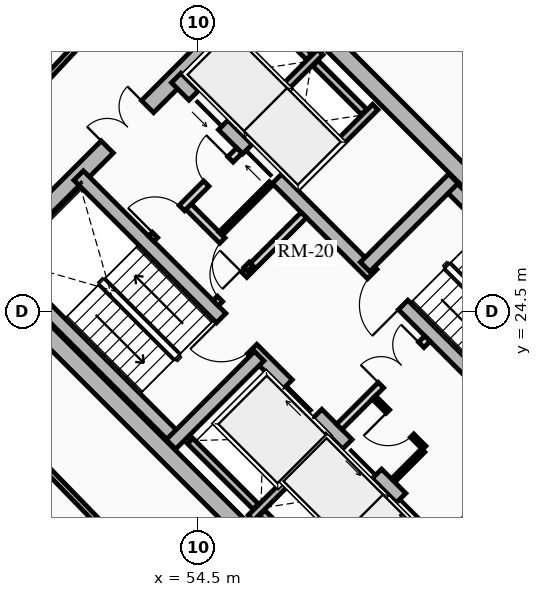
"""IFC4 building model, lengths in metres.
Left out: names, types, materials, properties, quantities, classifications, styles, units other than length and angle.
Written with IfcOpenShell. Run it as: python <this file> out.ifc"""

import sys

from ifc_helpers import new_model, si_unit, direction, frame, frame_2d, origin, place, context, subcontext, project, spatial, rectangle, extrude, source, transform, mapped, element, fill, save


model = new_model("IFC4")
c1 = context("Model", 3, precision=1e-05, world=origin(), true_north=direction((0.0, 1.0)))
c2 = subcontext(c1, "Body", "Model", "MODEL_VIEW")
j1 = project(units=[si_unit("LENGTHUNIT", "METRE"), si_unit("PLANEANGLEUNIT", "RADIAN")], contexts=[c1])
p1 = place(None, origin())
s1 = spatial("IfcSite", under=j1, at=p1, CompositionType="ELEMENT")
p2 = place(p1, origin())
s2 = spatial("IfcBuilding", under=s1, at=p2, CompositionType="ELEMENT")
p3 = place(p2, frame((0.0, 0.0, 125.44)))
s3 = spatial("IfcBuildingStorey", under=s2, at=p3, CompositionType="ELEMENT", Elevation=125.44)
for number, where, z_axis, x_axis in (
    (1, (58.737, 15.697, 0.0), (0.0, 0.0, 1.0), (-0.707, 0.707, 0.0)),
    (2, (66.303, 23.263, 0.0), (0.0, 0.0, 1.0), (-0.707, 0.707, 0.0)),
):
    element("IfcWall", number, at=place(p3, frame(where, z_axis=z_axis, x_axis=x_axis)), inside=s3, PredefinedType="SHEAR", context=c2, shape_type="SweptSolid", body=[
        extrude(rectangle(XDim=14.2, YDim=0.45, at=frame_2d((7.1, 0.0))), origin(), (0.0, 0.0, 1.0), 3.72),
    ])
p4 = place(p3, frame((58.578, 15.856, 0.0), z_axis=(0.0, 0.0, 1.0), x_axis=(0.707106781187, 0.707106781187, 0.0)))
e3 = element("IfcWall", 3, at=p4, inside=s3, PredefinedType="SHEAR", context=c2, shape_type="SweptSolid", body=[
    extrude(rectangle(XDim=10.7, YDim=0.45, at=frame_2d((5.35, 0.0))), origin(), (0.0, 0.0, 1.0), 3.72),
])
m1 = source(origin(), c2, "Body", "SweptSolid", [
    extrude(rectangle(XDim=1.5, YDim=2.02, at=frame_2d((0.75, 1.01))), frame((0.0, 0.235, 0.0), z_axis=(0.0, -1.0, 0.0), x_axis=(1.0, 0.0, 0.0)), (0.0, 0.0, 1.0), 0.47),
])
p5 = place(p4, frame((5.45, 0.0, 0.0)))
e4 = element("IfcOpeningElement", 4, at=p5, cuts=e3, PredefinedType="OPENING", context=c2, shape_type="MappedRepresentation", body=[
    mapped(m1, transform((0.0, 0.0, 0.0), x_axis=(1.0, 0.0, 0.0), y_axis=(0.0, 1.0, 0.0), z_axis=(0.0, 0.0, 1.0), scale=1.0)),
])
p6 = place(p3, frame((48.856, 25.578, 0.0), z_axis=(0.0, 0.0, 1.0), x_axis=(0.707106781187, 0.707106781187, 0.0)))
e5 = element("IfcWall", 5, at=p6, inside=s3, PredefinedType="SHEAR", context=c2, shape_type="SweptSolid", body=[
    extrude(rectangle(XDim=10.7, YDim=0.45, at=frame_2d((5.35, 0.0))), origin(), (0.0, 0.0, 1.0), 3.72),
])
p7 = place(p6, frame((4.6, 0.0, 0.0)))
e6 = element("IfcOpeningElement", 6, at=p7, cuts=e5, PredefinedType="OPENING", context=c2, shape_type="MappedRepresentation", body=[
    mapped(m1, transform((0.0, 0.0, 0.0), x_axis=(1.0, 0.0, 0.0), y_axis=(0.0, 1.0, 0.0), z_axis=(0.0, 0.0, 1.0), scale=1.0)),
])
p8 = place(p3, frame((61.078, 18.355, 0.0), z_axis=(0.0, 0.0, 1.0), x_axis=(-0.707106781187, 0.707106781187, 0.0)))
e7 = element("IfcWall", 7, at=p8, inside=s3, PredefinedType="SHEAR", context=c2, shape_type="SweptSolid", body=[
    extrude(rectangle(XDim=13.75, YDim=0.35, at=frame_2d((6.875, 0.0))), origin(), (0.0, 0.0, 1.0), 3.72),
])
m2 = source(origin(), c2, "Body", "SweptSolid", [
    extrude(rectangle(XDim=1.1, YDim=2.015, at=frame_2d((0.55, 1.007))), frame((0.0, 0.185, 0.0), z_axis=(0.0, -1.0, 0.0), x_axis=(1.0, 0.0, 0.0)), (0.0, 0.0, 1.0), 0.37),
])
p9 = place(p8, frame((4.875, 0.0, 0.0)))
e8 = element("IfcOpeningElement", 8, at=p9, cuts=e7, PredefinedType="OPENING", context=c2, shape_type="MappedRepresentation", body=[
    mapped(m2, transform((0.0, 0.0, 0.0), x_axis=(1.0, 0.0, 0.0), y_axis=(0.0, 1.0, 0.0), z_axis=(0.0, 0.0, 1.0), scale=1.0)),
])
p10 = place(p8, frame((0.65, 0.0, 0.0)))
e9 = element("IfcOpeningElement", 9, at=p10, cuts=e7, PredefinedType="OPENING", context=c2, shape_type="MappedRepresentation", body=[
    mapped(m2, transform((0.0, 0.0, 0.0), x_axis=(1.0, 0.0, 0.0), y_axis=(0.0, 1.0, 0.0), z_axis=(0.0, 0.0, 1.0), scale=1.0)),
])
p11 = place(p8, frame((2.65, 0.0, 0.0)))
e10 = element("IfcOpeningElement", 10, at=p11, cuts=e7, PredefinedType="OPENING", context=c2, shape_type="MappedRepresentation", body=[
    mapped(m2, transform((0.0, 0.0, 0.0), x_axis=(1.0, 0.0, 0.0), y_axis=(0.0, 1.0, 0.0), z_axis=(0.0, 0.0, 1.0), scale=1.0)),
])
m3 = source(origin(), c2, "Body", "SweptSolid", [
    extrude(rectangle(XDim=1.15, YDim=2.02, at=frame_2d((0.575, 1.01))), frame((0.0, 0.185, 0.0), z_axis=(0.0, -1.0, 0.0), x_axis=(1.0, 0.0, 0.0)), (0.0, 0.0, 1.0), 0.37),
])
p12 = place(p8, frame((7.295, 0.0, 0.0)))
e11 = element("IfcOpeningElement", 11, at=p12, cuts=e7, PredefinedType="OPENING", context=c2, shape_type="MappedRepresentation", body=[
    mapped(m3, transform((0.0, 0.0, 0.0), x_axis=(1.0, 0.0, 0.0), y_axis=(0.0, 1.0, 0.0), z_axis=(0.0, 0.0, 1.0), scale=1.0)),
])
p13 = place(p3, frame((63.645, 20.922, 0.0), z_axis=(0.0, 0.0, 1.0), x_axis=(-0.707106781187, 0.707106781187, 0.0)))
e12 = element("IfcWall", 12, at=p13, inside=s3, PredefinedType="SHEAR", context=c2, shape_type="SweptSolid", body=[
    extrude(rectangle(XDim=13.75, YDim=0.35, at=frame_2d((6.875, 0.0))), origin(), (0.0, 0.0, 1.0), 3.72),
])
p14 = place(p13, frame((10.0, 0.0, 0.0)))
e13 = element("IfcOpeningElement", 13, at=p14, cuts=e12, PredefinedType="OPENING", context=c2, shape_type="MappedRepresentation", body=[
    mapped(m2, transform((0.0, 0.0, 0.0), x_axis=(1.0, 0.0, 0.0), y_axis=(0.0, 1.0, 0.0), z_axis=(0.0, 0.0, 1.0), scale=1.0)),
])
p15 = place(p13, frame((12.0, 0.0, 0.0)))
e14 = element("IfcOpeningElement", 14, at=p15, cuts=e12, PredefinedType="OPENING", context=c2, shape_type="MappedRepresentation", body=[
    mapped(m2, transform((0.0, 0.0, 0.0), x_axis=(1.0, 0.0, 0.0), y_axis=(0.0, 1.0, 0.0), z_axis=(0.0, 0.0, 1.0), scale=1.0)),
])
p16 = place(p13, frame((5.305, 0.0, 0.0)))
e15 = element("IfcOpeningElement", 15, at=p16, cuts=e12, PredefinedType="OPENING", context=c2, shape_type="MappedRepresentation", body=[
    mapped(m3, transform((0.0, 0.0, 0.0), x_axis=(1.0, 0.0, 0.0), y_axis=(0.0, 1.0, 0.0), z_axis=(0.0, 0.0, 1.0), scale=1.0)),
])
p17 = place(p3, frame((53.922, 21.141, 0.0), z_axis=(0.0, 0.0, 1.0), x_axis=(-0.707088616009, 0.707124945897, 0.0)))
e16 = element("IfcWall", 16, at=p17, inside=s3, PredefinedType="SHEAR", context=c2, shape_type="SweptSolid", body=[
    extrude(rectangle(XDim=6.72, YDim=0.35, at=frame_2d((3.36, 0.0))), origin(), (0.0, 0.0, 1.0), 3.72),
])
p18 = place(p3, frame((53.784, 21.003, 0.0), z_axis=(0.0, 0.0, 1.0), x_axis=(0.707106781187, 0.707106781187, 0.0)))
e17 = element("IfcWall", 17, at=p18, inside=s3, PredefinedType="SHEAR", context=c2, shape_type="SweptSolid", body=[
    extrude(rectangle(XDim=3.285, YDim=0.35, at=frame_2d((1.643, 0.0))), origin(), (0.0, 0.0, 1.0), 3.72),
])
p19 = place(p3, frame((65.83, 23.107, 0.0), z_axis=(0.0, 0.0, 1.0), x_axis=(-0.707088616009, 0.707124945897, 0.0)))
e18 = element("IfcWall", 18, at=p19, inside=s3, PredefinedType="SHEAR", context=c2, shape_type="SweptSolid", body=[
    extrude(rectangle(XDim=6.72, YDim=0.35, at=frame_2d((3.36, 0.0))), origin(), (0.0, 0.0, 1.0), 3.72),
])
p20 = place(p3, frame((58.893, 25.674, 0.0), z_axis=(0.0, 0.0, 1.0), x_axis=(0.707106781187, 0.707106781187, 0.0)))
e19 = element("IfcWall", 19, at=p20, inside=s3, PredefinedType="SHEAR", context=c2, shape_type="SweptSolid", body=[
    extrude(rectangle(XDim=3.285, YDim=0.35, at=frame_2d((1.643, 0.0))), origin(), (0.0, 0.0, 1.0), 3.72),
])
p21 = place(p3, frame((55.888, 19.069, 0.0), z_axis=(0.0, 0.0, 1.0), x_axis=(0.707106781187, 0.707106781187, 0.0)))
e20 = element("IfcWall", 20, at=p21, inside=s3, PredefinedType="SHEAR", context=c2, shape_type="SweptSolid", body=[
    extrude(rectangle(XDim=2.97, YDim=0.2, at=frame_2d((1.485, 0.0))), origin(), (0.0, 0.0, 1.0), 3.72),
])
p22 = place(p3, frame((56.015, 19.366, 0.0), z_axis=(0.0, 0.0, 1.0), x_axis=(-0.707106781187, 0.707106781187, 0.0)))
e21 = element("IfcWall", 21, at=p22, inside=s3, PredefinedType="SHEAR", context=c2, shape_type="SweptSolid", body=[
    extrude(rectangle(XDim=2.44, YDim=0.2, at=frame_2d((1.22, 0.0))), origin(), (0.0, 0.0, 1.0), 3.72),
])
p23 = place(p3, frame((57.284, 17.673, 0.0), z_axis=(0.0, 0.0, 1.0), x_axis=(0.707147878904, 0.70706568108, 0.0)))
e22 = element("IfcWall", 22, at=p23, inside=s3, PredefinedType="SHEAR", context=c2, shape_type="SweptSolid", body=[
    extrude(rectangle(XDim=2.97, YDim=0.2, at=frame_2d((1.485, 0.0))), origin(), (0.0, 0.0, 1.0), 3.72),
])
p24 = place(p3, frame((57.412, 17.97, 0.0), z_axis=(0.0, 0.0, 1.0), x_axis=(-0.707106781187, 0.707106781187, 0.0)))
e23 = element("IfcWall", 23, at=p24, inside=s3, PredefinedType="SHEAR", context=c2, shape_type="SweptSolid", body=[
    extrude(rectangle(XDim=1.735, YDim=0.2, at=frame_2d((0.867, 0.0))), origin(), (0.0, 0.0, 1.0), 3.72),
])
p25 = place(p3, frame((57.062, 27.781, 0.0), z_axis=(0.0, 0.0, 1.0), x_axis=(0.707106781187, 0.707106781187, 0.0)))
e24 = element("IfcWall", 24, at=p25, inside=s3, PredefinedType="SHEAR", context=c2, shape_type="SweptSolid", body=[
    extrude(rectangle(XDim=2.97, YDim=0.2, at=frame_2d((1.485, 0.0))), origin(), (0.0, 0.0, 1.0), 3.72),
])
p26 = place(p3, frame((55.615, 29.227, 0.0), z_axis=(0.0, 0.0, 1.0), x_axis=(0.707147878904, 0.70706568108, 0.0)))
e25 = element("IfcWall", 25, at=p26, inside=s3, PredefinedType="SHEAR", context=c2, shape_type="SweptSolid", body=[
    extrude(rectangle(XDim=2.97, YDim=0.2, at=frame_2d((1.485, 0.0))), origin(), (0.0, 0.0, 1.0), 3.72),
])
p27 = place(p3, frame((58.865, 29.754, 0.0), z_axis=(0.0, 0.0, 1.0), x_axis=(-0.707174411312, 0.707039144592, 0.0)))
e26 = element("IfcWall", 26, at=p27, inside=s3, PredefinedType="SHEAR", context=c2, shape_type="SweptSolid", body=[
    extrude(rectangle(XDim=1.805, YDim=0.2, at=frame_2d((0.902, 0.0))), origin(), (0.0, 0.0, 1.0), 3.72),
])
p28 = place(p3, frame((57.419, 31.2, 0.0), z_axis=(0.0, 0.0, 1.0), x_axis=(-0.707032117043, 0.707181437447, 0.0)))
e27 = element("IfcWall", 27, at=p28, inside=s3, PredefinedType="SHEAR", context=c2, shape_type="SweptSolid", body=[
    extrude(rectangle(XDim=1.635, YDim=0.2, at=frame_2d((0.817, 0.0))), origin(), (0.0, 0.0, 1.0), 3.72),
])
p29 = place(p3, frame((58.214, 21.467, 0.0), z_axis=(0.0, 0.0, 1.0), x_axis=(0.707106781187, 0.707106781187, 0.0)))
e28 = element("IfcWall", 28, at=p29, inside=s3, PredefinedType="PARTITIONING", context=c2, shape_type="SweptSolid", body=[
    extrude(rectangle(XDim=3.28, YDim=0.2, at=frame_2d((1.64, 0.0))), origin(), (0.0, 0.0, 1.0), 3.425),
])
m4 = source(origin(), c2, "Body", "SweptSolid", [
    extrude(rectangle(XDim=1.5, YDim=2.02, at=frame_2d((0.75, 1.01))), frame((0.0, 0.11, 0.0), z_axis=(0.0, -1.0, 0.0), x_axis=(1.0, 0.0, 0.0)), (0.0, 0.0, 1.0), 0.22),
])
p30 = place(p29, frame((1.55, 0.0, 0.0)))
e29 = element("IfcOpeningElement", 29, at=p30, cuts=e28, PredefinedType="OPENING", context=c2, shape_type="MappedRepresentation", body=[
    mapped(m4, transform((0.0, 0.0, 0.0), x_axis=(1.0, 0.0, 0.0), y_axis=(0.0, 1.0, 0.0), z_axis=(0.0, 0.0, 1.0), scale=1.0)),
])
p31 = place(p3, frame((54.961, 24.719, 0.0), z_axis=(0.0, 0.0, 1.0), x_axis=(0.707106781187, 0.707106781187, 0.0)))
e30 = element("IfcWall", 30, at=p31, inside=s3, PredefinedType="PARTITIONING", context=c2, shape_type="SweptSolid", body=[
    extrude(rectangle(XDim=3.28, YDim=0.2, at=frame_2d((1.64, 0.0))), origin(), (0.0, 0.0, 1.0), 3.425),
])
m5 = source(origin(), c2, "Body", "SweptSolid", [
    extrude(rectangle(XDim=0.9, YDim=2.005, at=frame_2d((0.45, 1.002))), frame((0.0, 0.11, 0.0), z_axis=(0.0, -1.0, 0.0), x_axis=(1.0, 0.0, 0.0)), (0.0, 0.0, 1.0), 0.22),
])
p32 = place(p31, frame((0.16, 0.0, 0.0)))
e31 = element("IfcOpeningElement", 31, at=p32, cuts=e30, PredefinedType="OPENING", context=c2, shape_type="MappedRepresentation", body=[
    mapped(m5, transform((0.0, 0.0, 0.0), x_axis=(1.0, 0.0, 0.0), y_axis=(0.0, 1.0, 0.0), z_axis=(0.0, 0.0, 1.0), scale=1.0)),
])
p33 = place(p3, frame((55.874, 25.631, 0.0), z_axis=(0.0, 0.0, 1.0), x_axis=(-0.707157639372, 0.707055919343, 0.0)))
e32 = element("IfcWall", 32, at=p33, inside=s3, PredefinedType="PARTITIONING", context=c2, shape_type="SweptSolid", body=[
    extrude(rectangle(XDim=2.4, YDim=0.2, at=frame_2d((1.2, 0.0))), origin(), (0.0, 0.0, 1.0), 3.425),
])
p34 = place(p33, frame((0.14, 0.0, 0.0)))
e33 = element("IfcOpeningElement", 33, at=p34, cuts=e32, PredefinedType="OPENING", context=c2, shape_type="MappedRepresentation", body=[
    mapped(m5, transform((0.0, 0.0, 0.0), x_axis=(1.0, 0.0, 0.0), y_axis=(0.0, 1.0, 0.0), z_axis=(0.0, 0.0, 1.0), scale=1.0)),
])
p35 = place(p3, frame((53.264, 26.416, 0.0), z_axis=(0.0, 0.0, 1.0), x_axis=(0.707106781187, 0.707106781187, 0.0)))
e34 = element("IfcWall", 34, at=p35, inside=s3, PredefinedType="PARTITIONING", context=c2, shape_type="SweptSolid", body=[
    extrude(rectangle(XDim=3.28, YDim=0.2, at=frame_2d((1.64, 0.0))), origin(), (0.0, 0.0, 1.0), 3.425),
])
m6 = source(origin(), c2, "Body", "SweptSolid", [
    extrude(rectangle(XDim=1.0, YDim=2.015, at=frame_2d((0.5, 1.007))), frame((0.0, 0.11, 0.0), z_axis=(0.0, -1.0, 0.0), x_axis=(1.0, 0.0, 0.0)), (0.0, 0.0, 1.0), 0.22),
])
p36 = place(p35, frame((0.14, 0.0, 0.0)))
e35 = element("IfcOpeningElement", 35, at=p36, cuts=e34, PredefinedType="OPENING", context=c2, shape_type="MappedRepresentation", body=[
    mapped(m6, transform((0.0, 0.0, 0.0), x_axis=(1.0, 0.0, 0.0), y_axis=(0.0, 1.0, 0.0), z_axis=(0.0, 0.0, 1.0), scale=1.0)),
])
p37 = place(p35, frame((2.05, 0.0, 0.0)))
e36 = element("IfcOpeningElement", 36, at=p37, cuts=e34, PredefinedType="OPENING", context=c2, shape_type="MappedRepresentation", body=[
    mapped(m5, transform((0.0, 0.0, 0.0), x_axis=(1.0, 0.0, 0.0), y_axis=(0.0, 1.0, 0.0), z_axis=(0.0, 0.0, 1.0), scale=1.0)),
])
p38 = place(p3, frame((60.448, 20.915, 0.0), z_axis=(0.0, 0.0, 1.0), x_axis=(-0.707106781187, 0.707106781187, 0.0)))
e37 = element("IfcWall", 37, at=p38, inside=s3, PredefinedType="PARTITIONING", context=c2, shape_type="SweptSolid", body=[
    extrude(rectangle(XDim=1.87, YDim=0.125, at=frame_2d((0.935, 0.0))), origin(), (0.0, 0.0, 1.0), 3.425),
])
m7 = source(origin(), c2, "Body", "SweptSolid", [
    extrude(rectangle(XDim=0.9, YDim=2.005, at=frame_2d((0.45, 1.002))), frame((0.0, 0.073, 0.0), z_axis=(0.0, -1.0, 0.0), x_axis=(1.0, 0.0, 0.0)), (0.0, 0.0, 1.0), 0.145),
])
p39 = place(p38, frame((0.45, 0.0, 0.0)))
e38 = element("IfcOpeningElement", 38, at=p39, cuts=e37, PredefinedType="OPENING", context=c2, shape_type="MappedRepresentation", body=[
    mapped(m7, transform((0.0, 0.0, 0.0), x_axis=(1.0, 0.0, 0.0), y_axis=(0.0, 1.0, 0.0), z_axis=(0.0, 0.0, 1.0), scale=1.0)),
])
p40 = place(p3, frame((59.643, 20.066, 0.0), z_axis=(0.0, 0.0, 1.0), x_axis=(0.707106781187, 0.707106781187, 0.0)))
e39 = element("IfcWall", 39, at=p40, inside=s3, PredefinedType="PARTITIONING", context=c2, shape_type="SweptSolid", body=[
    extrude(rectangle(XDim=1.1, YDim=0.125, at=frame_2d((0.55, 0.0))), origin(), (0.0, 0.0, 1.0), 3.425),
])
p41 = place(p3, frame((55.089, 26.543, 0.0), z_axis=(0.0, 0.0, 1.0), x_axis=(0.707106781187, 0.707106781187, 0.0)))
e40 = element("IfcWall", 40, at=p41, inside=s3, PredefinedType="PARTITIONING", context=c2, shape_type="SweptSolid", body=[
    extrude(rectangle(XDim=1.88, YDim=0.125, at=frame_2d((0.94, 0.0))), origin(), (0.0, 0.0, 1.0), 3.425),
])
p42 = place(p3, frame((63.086, 30.086, 0.0), z_axis=(0.0, 0.0, 1.0), x_axis=(-0.699075897379, 0.715047473741, 0.0)))
e41 = element("IfcWall", 41, at=p42, inside=s3, PredefinedType="PARTITIONING", context=c2, shape_type="SweptSolid", body=[
    extrude(rectangle(XDim=6.114, YDim=0.15, at=frame_2d((3.057, 0.0))), origin(), (0.0, 0.0, 1.0), 2.995),
])
p43 = place(p3, frame((52.043, 32.28, 0.0), z_axis=(0.0, 0.0, 1.0), x_axis=(-0.682606081633, -0.730786519661, 0.0)))
e42 = element("IfcWall", 42, at=p43, inside=s3, PredefinedType="PARTITIONING", context=c2, shape_type="SweptSolid", body=[
    extrude(rectangle(XDim=6.527, YDim=0.15, at=frame_2d((3.263, 0.0))), origin(), (0.0, 0.0, 1.0), 2.995),
])
p44 = place(p3, frame((47.706, 23.253, 0.0), z_axis=(0.0, 0.0, 1.0), x_axis=(0.696179266346, -0.717867974707, 0.0)))
e43 = element("IfcWall", 43, at=p44, inside=s3, PredefinedType="PARTITIONING", context=c2, shape_type="SweptSolid", body=[
    extrude(rectangle(XDim=6.045, YDim=0.15, at=frame_2d((3.022, 0.0))), origin(), (0.0, 0.0, 1.0), 3.425),
])
m8 = source(origin(), c2, "Body", "SweptSolid", [
    extrude(rectangle(XDim=1.1, YDim=2.015, at=frame_2d((0.55, 1.007))), frame((0.0, 0.025, 0.0), z_axis=(0.0, -1.0, 0.0), x_axis=(1.0, 0.0, 0.0)), (0.0, 0.0, 1.0), 0.05),
])
p45 = place(p9, origin())
e44 = element("IfcDoor", 44, at=p45, inside=s3, OperationType="SLIDING_TO_RIGHT", PredefinedType="DOOR", context=c2, shape_type="MappedRepresentation", body=[
    mapped(m8, transform((0.0, 0.0, 0.0), x_axis=(1.0, 0.0, 0.0), y_axis=(0.0, 1.0, 0.0), z_axis=(0.0, 0.0, 1.0), scale=1.0)),
])
fill(e8, e44)
p46 = place(p10, origin())
e45 = element("IfcDoor", 45, at=p46, inside=s3, OperationType="SLIDING_TO_RIGHT", PredefinedType="DOOR", context=c2, shape_type="MappedRepresentation", body=[
    mapped(m8, transform((0.0, 0.0, 0.0), x_axis=(1.0, 0.0, 0.0), y_axis=(0.0, 1.0, 0.0), z_axis=(0.0, 0.0, 1.0), scale=1.0)),
])
fill(e9, e45)
p47 = place(p11, origin())
e46 = element("IfcDoor", 46, at=p47, inside=s3, OperationType="SLIDING_TO_LEFT", PredefinedType="DOOR", context=c2, shape_type="MappedRepresentation", body=[
    mapped(m8, transform((0.0, 0.0, 0.0), x_axis=(1.0, 0.0, 0.0), y_axis=(0.0, 1.0, 0.0), z_axis=(0.0, 0.0, 1.0), scale=1.0)),
])
fill(e10, e46)
p48 = place(p14, origin())
e47 = element("IfcDoor", 47, at=p48, inside=s3, OperationType="SLIDING_TO_RIGHT", PredefinedType="DOOR", context=c2, shape_type="MappedRepresentation", body=[
    mapped(m8, transform((0.0, 0.0, 0.0), x_axis=(1.0, 0.0, 0.0), y_axis=(0.0, 1.0, 0.0), z_axis=(0.0, 0.0, 1.0), scale=1.0)),
])
fill(e13, e47)
p49 = place(p15, origin())
e48 = element("IfcDoor", 48, at=p49, inside=s3, OperationType="SLIDING_TO_LEFT", PredefinedType="DOOR", context=c2, shape_type="MappedRepresentation", body=[
    mapped(m8, transform((0.0, 0.0, 0.0), x_axis=(1.0, 0.0, 0.0), y_axis=(0.0, 1.0, 0.0), z_axis=(0.0, 0.0, 1.0), scale=1.0)),
])
fill(e14, e48)
m9 = source(origin(), c2, "Body", "SweptSolid", [
    extrude(rectangle(XDim=1.15, YDim=2.02, at=frame_2d((0.575, 1.01))), frame((0.0, 0.025, 0.0), z_axis=(0.0, -1.0, 0.0), x_axis=(1.0, 0.0, 0.0)), (0.0, 0.0, 1.0), 0.05),
])
p50 = place(p12, origin())
e49 = element("IfcDoor", 49, at=p50, inside=s3, OperationType="SINGLE_SWING_RIGHT", PredefinedType="DOOR", context=c2, shape_type="MappedRepresentation", body=[
    mapped(m9, transform((0.0, 0.0, 0.0), x_axis=(1.0, 0.0, 0.0), y_axis=(0.0, 1.0, 0.0), z_axis=(0.0, 0.0, 1.0), scale=1.0)),
])
fill(e11, e49)
p51 = place(p16, origin())
e50 = element("IfcDoor", 50, at=p51, inside=s3, OperationType="SINGLE_SWING_LEFT", PredefinedType="DOOR", context=c2, shape_type="MappedRepresentation", body=[
    mapped(m9, transform((0.0, 0.0, 0.0), x_axis=(1.0, 0.0, 0.0), y_axis=(0.0, 1.0, 0.0), z_axis=(0.0, 0.0, 1.0), scale=1.0)),
])
fill(e15, e50)
m10 = source(origin(), c2, "Body", "SweptSolid", [
    extrude(rectangle(XDim=1.5, YDim=2.02, at=frame_2d((0.75, 1.01))), frame((0.0, 0.025, 0.0), z_axis=(0.0, -1.0, 0.0), x_axis=(1.0, 0.0, 0.0)), (0.0, 0.0, 1.0), 0.05),
])
p52 = place(p7, origin())
e51 = element("IfcDoor", 51, at=p52, inside=s3, OperationType="DOUBLE_DOOR_SINGLE_SWING", PredefinedType="DOOR", context=c2, shape_type="MappedRepresentation", body=[
    mapped(m10, transform((0.0, 0.0, 0.0), x_axis=(1.0, 0.0, 0.0), y_axis=(0.0, 1.0, 0.0), z_axis=(0.0, 0.0, 1.0), scale=1.0)),
])
fill(e6, e51)
p53 = place(p30, origin())
e52 = element("IfcDoor", 52, at=p53, inside=s3, OperationType="DOUBLE_DOOR_SINGLE_SWING", PredefinedType="DOOR", context=c2, shape_type="MappedRepresentation", body=[
    mapped(m10, transform((0.0, 0.0, 0.0), x_axis=(1.0, 0.0, 0.0), y_axis=(0.0, 1.0, 0.0), z_axis=(0.0, 0.0, 1.0), scale=1.0)),
])
fill(e29, e52)
m11 = source(origin(), c2, "Body", "SweptSolid", [
    extrude(rectangle(XDim=0.9, YDim=2.005, at=frame_2d((0.45, 1.002))), frame((0.0, 0.025, 0.0), z_axis=(0.0, -1.0, 0.0), x_axis=(1.0, 0.0, 0.0)), (0.0, 0.0, 1.0), 0.05),
])
p54 = place(p32, origin())
e53 = element("IfcDoor", 53, at=p54, inside=s3, OperationType="SINGLE_SWING_RIGHT", PredefinedType="DOOR", context=c2, shape_type="MappedRepresentation", body=[
    mapped(m11, transform((0.0, 0.0, 0.0), x_axis=(1.0, 0.0, 0.0), y_axis=(0.0, 1.0, 0.0), z_axis=(0.0, 0.0, 1.0), scale=1.0)),
])
fill(e31, e53)
m12 = source(origin(), c2, "Body", "SweptSolid", [
    extrude(rectangle(XDim=1.0, YDim=2.015, at=frame_2d((0.5, 1.007))), frame((0.0, 0.025, 0.0), z_axis=(0.0, -1.0, 0.0), x_axis=(1.0, 0.0, 0.0)), (0.0, 0.0, 1.0), 0.05),
])
p55 = place(p36, origin())
e54 = element("IfcDoor", 54, at=p55, inside=s3, OperationType="SINGLE_SWING_LEFT", PredefinedType="DOOR", context=c2, shape_type="MappedRepresentation", body=[
    mapped(m12, transform((0.0, 0.0, 0.0), x_axis=(1.0, 0.0, 0.0), y_axis=(0.0, 1.0, 0.0), z_axis=(0.0, 0.0, 1.0), scale=1.0)),
])
fill(e35, e54)
p56 = place(p39, origin())
e55 = element("IfcDoor", 55, at=p56, inside=s3, OperationType="SINGLE_SWING_RIGHT", PredefinedType="DOOR", context=c2, shape_type="MappedRepresentation", body=[
    mapped(m11, transform((0.0, 0.0, 0.0), x_axis=(1.0, 0.0, 0.0), y_axis=(0.0, 1.0, 0.0), z_axis=(0.0, 0.0, 1.0), scale=1.0)),
])
fill(e38, e55)
p57 = place(p34, origin())
e56 = element("IfcDoor", 56, at=p57, inside=s3, OperationType="SINGLE_SWING_LEFT", PredefinedType="DOOR", context=c2, shape_type="MappedRepresentation", body=[
    mapped(m11, transform((0.0, 0.0, 0.0), x_axis=(1.0, 0.0, 0.0), y_axis=(0.0, 1.0, 0.0), z_axis=(0.0, 0.0, 1.0), scale=1.0)),
])
fill(e33, e56)
p58 = place(p37, origin())
e57 = element("IfcDoor", 57, at=p58, inside=s3, OperationType="SINGLE_SWING_RIGHT", PredefinedType="DOOR", context=c2, shape_type="MappedRepresentation", body=[
    mapped(m11, transform((0.0, 0.0, 0.0), x_axis=(1.0, 0.0, 0.0), y_axis=(0.0, 1.0, 0.0), z_axis=(0.0, 0.0, 1.0), scale=1.0)),
])
fill(e36, e57)
save(model, sys.argv[1])
